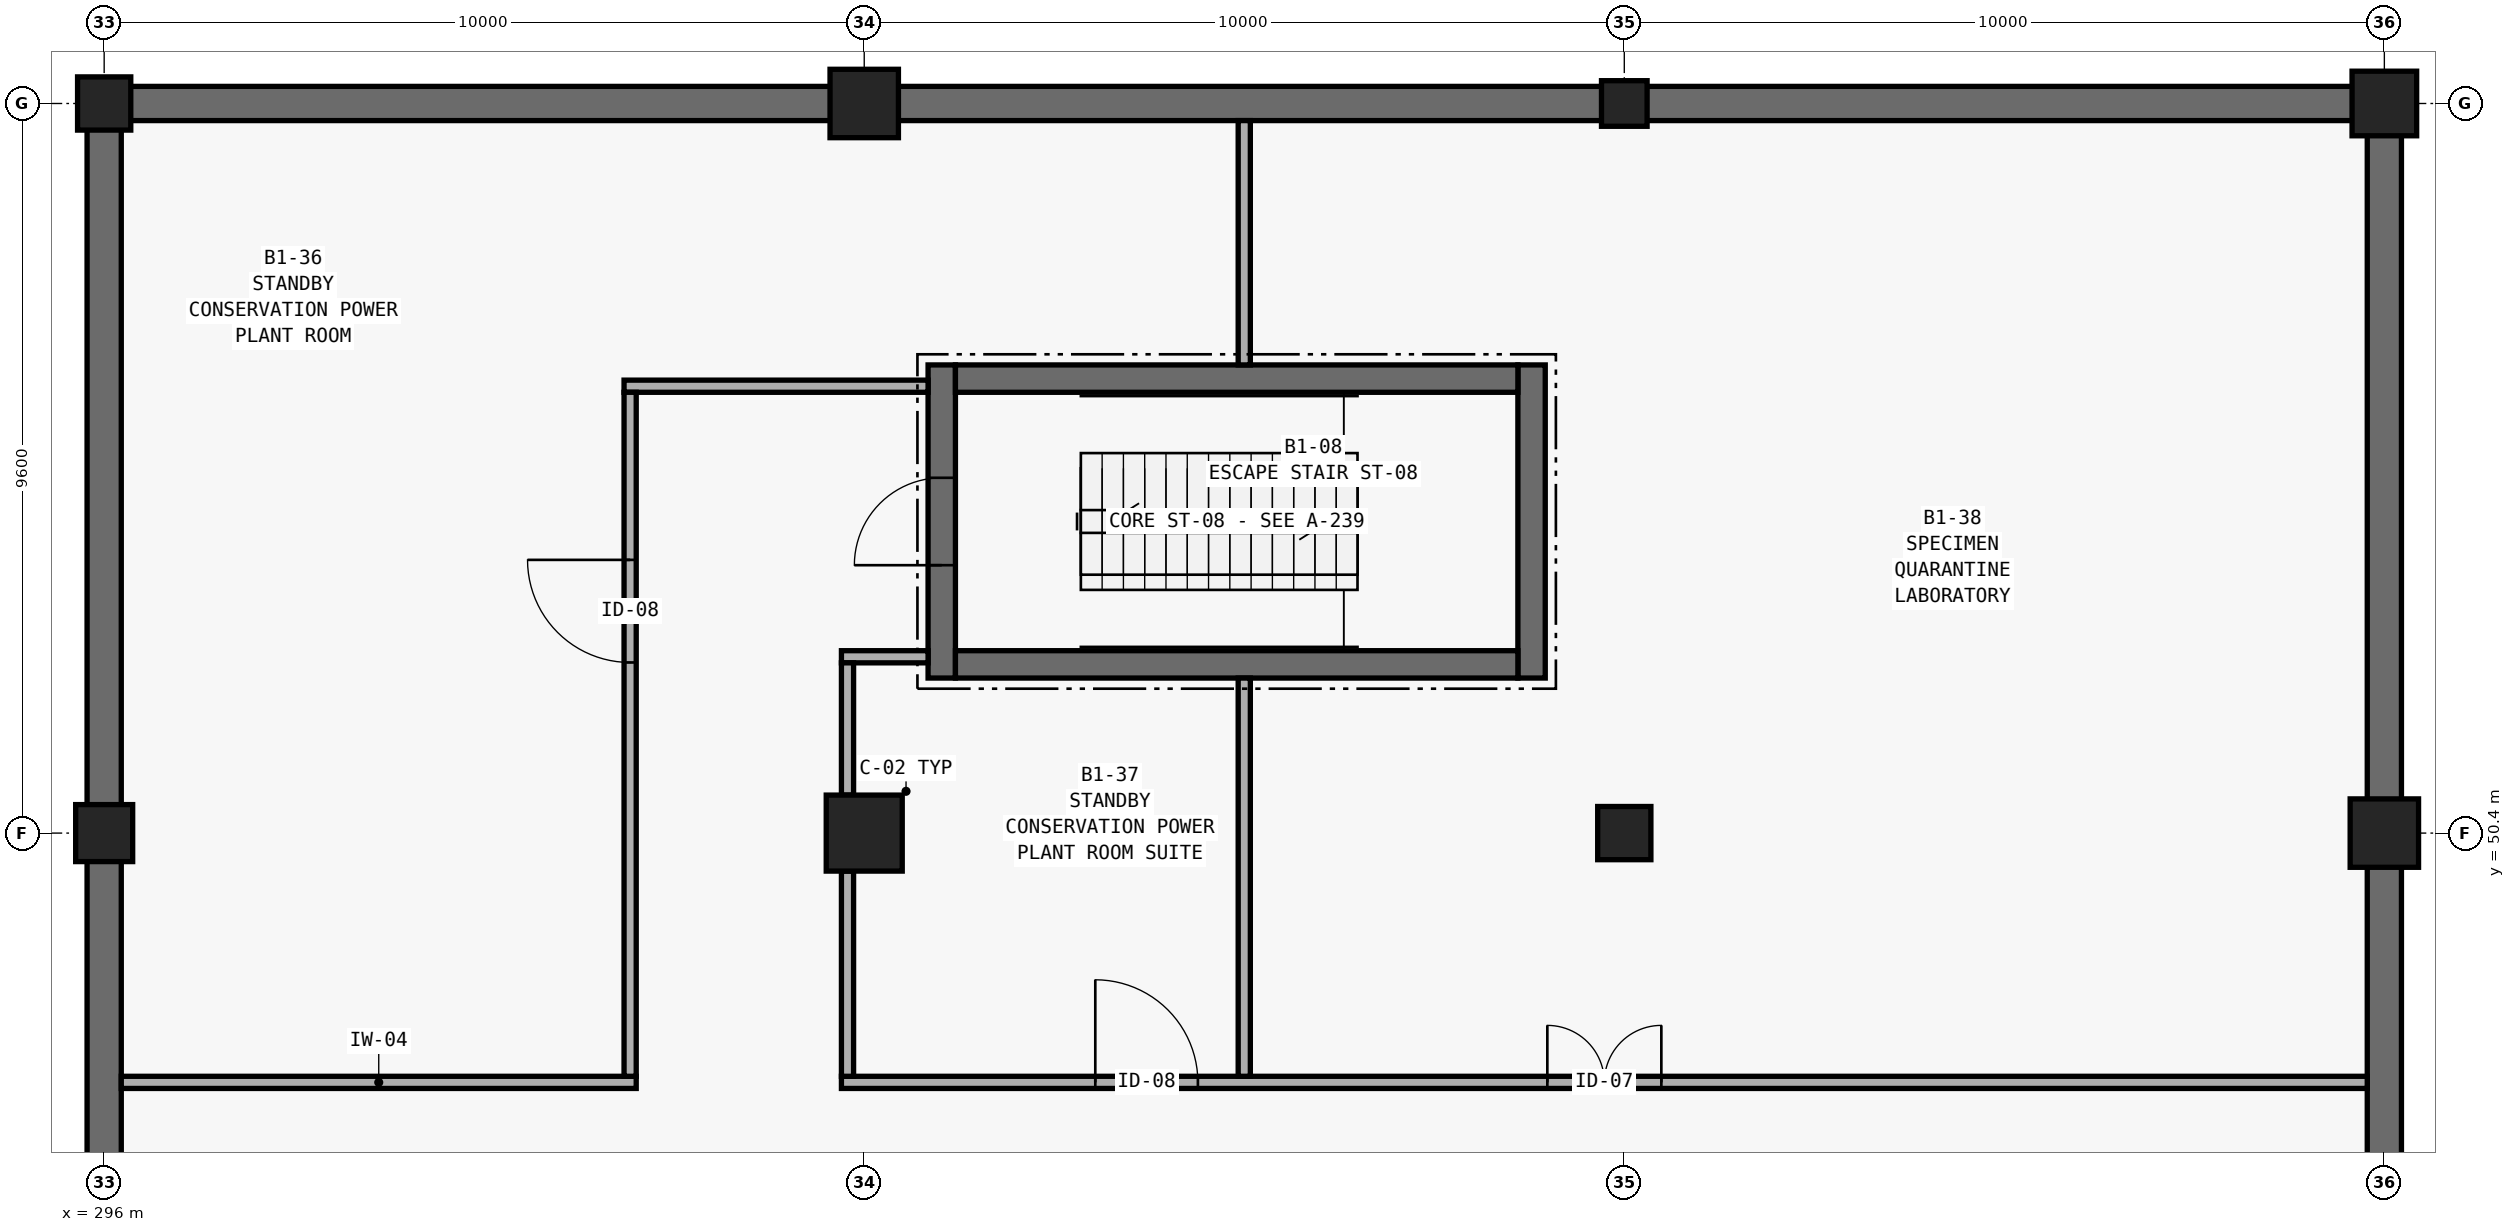
"""IFC4 building model, lengths in metres.
Left out: names, types, materials, properties, quantities, classifications, styles, units other than length and angle.
Written with IfcOpenShell. Run it as: python <this file> out.ifc"""

import sys

from ifc_helpers import new_model, si_unit, direction, frame, frame_2d, origin, origin_2d, place, context, subcontext, project, spatial, rectangle, extrude, element, fill, save


model = new_model("IFC4")
c1 = context("Model", 3, precision=1e-05, world=origin(), true_north=direction((0.0, 1.0)))
c2 = subcontext(c1, "Body", "Model", "MODEL_VIEW")
j1 = project(units=[si_unit("LENGTHUNIT", "METRE"), si_unit("PLANEANGLEUNIT", "RADIAN")], contexts=[c1])
p1 = place(None, origin())
s1 = spatial("IfcSite", under=j1, at=p1, CompositionType="ELEMENT")
p2 = place(p1, origin())
s2 = spatial("IfcBuilding", under=s1, at=p2, CompositionType="ELEMENT")
p3 = place(p2, frame((0.0, 0.0, -4.8)))
s3 = spatial("IfcBuildingStorey", under=s2, at=p3, CompositionType="ELEMENT", Elevation=-4.8)
p4 = place(p3, frame((296.0, 50.4, 0.0), z_axis=(0.0, 0.0, 1.0), x_axis=(1.0, 0.0, 0.0)))
e1 = element("IfcColumn", 1, at=p4, inside=s3, PredefinedType="COLUMN", context=c2, shape_type="SweptSolid", body=[
    extrude(rectangle(XDim=0.75, YDim=0.75, at=origin_2d()), origin(), (0.0, 0.0, 1.0), 4.8),
])
p5 = place(p3, frame((296.0, 60.0, 0.0), z_axis=(0.0, 0.0, 1.0), x_axis=(1.0, 0.0, 0.0)))
e2 = element("IfcColumn", 2, at=p5, inside=s3, PredefinedType="COLUMN", context=c2, shape_type="SweptSolid", body=[
    extrude(rectangle(XDim=0.7, YDim=0.7, at=origin_2d()), origin(), (0.0, 0.0, 1.0), 4.8),
])
p6 = place(p3, frame((306.0, 50.4, 0.0), z_axis=(0.0, 0.0, 1.0), x_axis=(1.0, 0.0, 0.0)))
e3 = element("IfcColumn", 3, at=p6, inside=s3, PredefinedType="COLUMN", context=c2, shape_type="SweptSolid", body=[
    extrude(rectangle(XDim=1.0, YDim=1.0, at=origin_2d()), origin(), (0.0, 0.0, 1.0), 4.8),
])
p7 = place(p3, frame((306.0, 60.0, 0.0), z_axis=(0.0, 0.0, 1.0), x_axis=(1.0, 0.0, 0.0)))
e4 = element("IfcColumn", 4, at=p7, inside=s3, PredefinedType="COLUMN", context=c2, shape_type="SweptSolid", body=[
    extrude(rectangle(XDim=0.9, YDim=0.9, at=origin_2d()), origin(), (0.0, 0.0, 1.0), 4.8),
])
p8 = place(p3, frame((316.0, 50.4, 0.0), z_axis=(0.0, 0.0, 1.0), x_axis=(1.0, 0.0, 0.0)))
e5 = element("IfcColumn", 5, at=p8, inside=s3, PredefinedType="COLUMN", context=c2, shape_type="SweptSolid", body=[
    extrude(rectangle(XDim=0.7, YDim=0.7, at=origin_2d()), origin(), (0.0, 0.0, 1.0), 4.8),
])
p9 = place(p3, frame((316.0, 60.0, 0.0), z_axis=(0.0, 0.0, 1.0), x_axis=(1.0, 0.0, 0.0)))
e6 = element("IfcColumn", 6, at=p9, inside=s3, PredefinedType="COLUMN", context=c2, shape_type="SweptSolid", body=[
    extrude(rectangle(XDim=0.6, YDim=0.6, at=origin_2d()), origin(), (0.0, 0.0, 1.0), 4.8),
])
p10 = place(p3, frame((326.0, 50.4, 0.0), z_axis=(0.0, 0.0, 1.0), x_axis=(1.0, 0.0, 0.0)))
e7 = element("IfcColumn", 7, at=p10, inside=s3, PredefinedType="COLUMN", context=c2, shape_type="SweptSolid", body=[
    extrude(rectangle(XDim=0.9, YDim=0.9, at=origin_2d()), origin(), (0.0, 0.0, 1.0), 4.8),
])
p11 = place(p3, frame((326.0, 60.0, 0.0), z_axis=(0.0, 0.0, 1.0), x_axis=(1.0, 0.0, 0.0)))
e8 = element("IfcColumn", 8, at=p11, inside=s3, PredefinedType="COLUMN", context=c2, shape_type="SweptSolid", body=[
    extrude(rectangle(XDim=0.85, YDim=0.85, at=origin_2d()), origin(), (0.0, 0.0, 1.0), 4.8),
])
p12 = place(p3, frame((326.0, 38.4, 0.0), z_axis=(0.0, 0.0, 1.0), x_axis=(0.0, 1.0, 0.0)))
e9 = element("IfcWall", 9, at=p12, inside=s3, PredefinedType="SHEAR", context=c2, shape_type="SweptSolid", body=[
    extrude(rectangle(XDim=12.0, YDim=0.45, at=frame_2d((6.0, 0.0))), origin(), (0.0, 0.0, 1.0), 4.8),
])
p13 = place(p3, frame((326.0, 50.4, 0.0), z_axis=(0.0, 0.0, 1.0), x_axis=(0.0, 1.0, 0.0)))
e10 = element("IfcWall", 10, at=p13, inside=s3, PredefinedType="SHEAR", context=c2, shape_type="SweptSolid", body=[
    extrude(rectangle(XDim=9.6, YDim=0.45, at=frame_2d((4.8, 0.0))), origin(), (0.0, 0.0, 1.0), 4.8),
])
for number, where, z_axis, x_axis in (
    (11, (326.0, 60.0, 0.0), (0.0, 0.0, 1.0), (-1.0, 0.0, 0.0)),
    (12, (316.0, 60.0, 0.0), (0.0, 0.0, 1.0), (-1.0, 0.0, 0.0)),
    (13, (306.0, 60.0, 0.0), (0.0, 0.0, 1.0), (-1.0, 0.0, 0.0)),
):
    element("IfcWall", number, at=place(p3, frame(where, z_axis=z_axis, x_axis=x_axis)), inside=s3, PredefinedType="SHEAR", context=c2, shape_type="SweptSolid", body=[
        extrude(rectangle(XDim=10.0, YDim=0.45, at=frame_2d((5.0, 0.0))), origin(), (0.0, 0.0, 1.0), 4.8),
    ])
p14 = place(p3, frame((296.0, 60.0, 0.0), z_axis=(0.0, 0.0, 1.0), x_axis=(0.0, -1.0, 0.0)))
e14 = element("IfcWall", 14, at=p14, inside=s3, PredefinedType="SHEAR", context=c2, shape_type="SweptSolid", body=[
    extrude(rectangle(XDim=9.6, YDim=0.45, at=frame_2d((4.8, 0.0))), origin(), (0.0, 0.0, 1.0), 4.8),
])
p15 = place(p3, frame((296.0, 50.4, 0.0), z_axis=(0.0, 0.0, 1.0), x_axis=(0.0, -1.0, 0.0)))
e15 = element("IfcWall", 15, at=p15, inside=s3, PredefinedType="SHEAR", context=c2, shape_type="SweptSolid", body=[
    extrude(rectangle(XDim=12.0, YDim=0.45, at=frame_2d((6.0, 0.0))), origin(), (0.0, 0.0, 1.0), 4.8),
])
p16 = place(p3, frame((307.02, 52.44, 0.0), z_axis=(0.0, 0.0, 1.0), x_axis=(0.0, 1.0, 0.0)))
e16 = element("IfcWall", 16, at=p16, inside=s3, PredefinedType="SHEAR", context=c2, shape_type="SweptSolid", body=[
    extrude(rectangle(XDim=4.12, YDim=0.36, at=frame_2d((2.06, 0.0))), origin(), (0.0, 0.0, 1.0), 4.38),
])
p17 = place(p16, frame((1.485, 0.0, 0.0)))
e17 = element("IfcOpeningElement", 17, at=p17, cuts=e16, PredefinedType="OPENING", context=c2, shape_type="SweptSolid", body=[
    extrude(rectangle(XDim=1.15, YDim=2.15, at=frame_2d((0.575, 1.075))), frame((0.0, 0.195, 0.0), z_axis=(0.0, -1.0, 0.0), x_axis=(1.0, 0.0, 0.0)), (0.0, 0.0, 1.0), 0.39),
])
p18 = place(p3, frame((314.78, 52.44, 0.0), z_axis=(0.0, 0.0, 1.0), x_axis=(0.0, 1.0, 0.0)))
e18 = element("IfcWall", 18, at=p18, inside=s3, PredefinedType="SHEAR", context=c2, shape_type="SweptSolid", body=[
    extrude(rectangle(XDim=4.12, YDim=0.36, at=frame_2d((2.06, 0.0))), origin(), (0.0, 0.0, 1.0), 4.38),
])
for number, where, z_axis, x_axis in (
    (19, (307.2, 56.38, 0.0), (0.0, 0.0, 1.0), (1.0, 0.0, 0.0)),
    (20, (307.2, 52.62, 0.0), (0.0, 0.0, 1.0), (1.0, 0.0, 0.0)),
):
    element("IfcWall", number, at=place(p3, frame(where, z_axis=z_axis, x_axis=x_axis)), inside=s3, PredefinedType="SHEAR", context=c2, shape_type="SweptSolid", body=[
        extrude(rectangle(XDim=7.4, YDim=0.36, at=frame_2d((3.7, 0.0))), origin(), (0.0, 0.0, 1.0), 4.38),
    ])
p19 = place(p3, frame((296.225, 47.12, 0.0), z_axis=(0.0, 0.0, 1.0), x_axis=(1.0, 0.0, 0.0)))
e21 = element("IfcWall", 21, at=p19, inside=s3, PredefinedType="PARTITIONING", context=c2, shape_type="SweptSolid", body=[
    extrude(rectangle(XDim=6.775, YDim=0.16, at=frame_2d((3.387, 0.0))), origin(), (0.0, 0.0, 1.0), 3.26),
])
p20 = place(p3, frame((305.7, 47.12, 0.0), z_axis=(0.0, 0.0, 1.0), x_axis=(1.0, 0.0, 0.0)))
e22 = element("IfcWall", 22, at=p20, inside=s3, PredefinedType="PARTITIONING", context=c2, shape_type="SweptSolid", body=[
    extrude(rectangle(XDim=20.075, YDim=0.16, at=frame_2d((10.038, 0.0))), origin(), (0.0, 0.0, 1.0), 3.26),
])
p21 = place(p20, frame((3.34, 0.0, 0.0)))
e23 = element("IfcOpeningElement", 23, at=p21, cuts=e22, PredefinedType="OPENING", context=c2, shape_type="SweptSolid", body=[
    extrude(rectangle(XDim=1.35, YDim=2.2, at=frame_2d((0.675, 1.1))), frame((0.0, 0.095, 0.0), z_axis=(0.0, -1.0, 0.0), x_axis=(1.0, 0.0, 0.0)), (0.0, 0.0, 1.0), 0.19),
])
p22 = place(p20, frame((9.288, 0.0, 0.0)))
e24 = element("IfcOpeningElement", 24, at=p22, cuts=e22, PredefinedType="OPENING", context=c2, shape_type="SweptSolid", body=[
    extrude(rectangle(XDim=1.5, YDim=2.2, at=frame_2d((0.75, 1.1))), frame((0.0, 0.095, 0.0), z_axis=(0.0, -1.0, 0.0), x_axis=(1.0, 0.0, 0.0)), (0.0, 0.0, 1.0), 0.19),
])
p23 = place(p3, frame((305.7, 52.72, 0.0), z_axis=(0.0, 0.0, 1.0), x_axis=(1.0, 0.0, 0.0)))
e25 = element("IfcWall", 25, at=p23, inside=s3, PredefinedType="PARTITIONING", context=c2, shape_type="SweptSolid", body=[
    extrude(rectangle(XDim=1.14, YDim=0.16, at=frame_2d((0.57, 0.0))), origin(), (0.0, 0.0, 1.0), 3.26),
])
p24 = place(p3, frame((302.84, 56.28, 0.0), z_axis=(0.0, 0.0, 1.0), x_axis=(1.0, 0.0, 0.0)))
e26 = element("IfcWall", 26, at=p24, inside=s3, PredefinedType="PARTITIONING", context=c2, shape_type="SweptSolid", body=[
    extrude(rectangle(XDim=4.0, YDim=0.16, at=frame_2d((2.0, 0.0))), origin(), (0.0, 0.0, 1.0), 3.26),
])
p25 = place(p3, frame((302.92, 47.2, 0.0), z_axis=(0.0, 0.0, 1.0), x_axis=(0.0, 1.0, 0.0)))
e27 = element("IfcWall", 27, at=p25, inside=s3, PredefinedType="PARTITIONING", context=c2, shape_type="SweptSolid", body=[
    extrude(rectangle(XDim=9.0, YDim=0.16, at=frame_2d((4.5, 0.0))), origin(), (0.0, 0.0, 1.0), 3.26),
])
p26 = place(p25, frame((5.445, 0.0, 0.0)))
e28 = element("IfcOpeningElement", 28, at=p26, cuts=e27, PredefinedType="OPENING", context=c2, shape_type="SweptSolid", body=[
    extrude(rectangle(XDim=1.35, YDim=2.2, at=frame_2d((0.675, 1.1))), frame((0.0, 0.095, 0.0), z_axis=(0.0, -1.0, 0.0), x_axis=(1.0, 0.0, 0.0)), (0.0, 0.0, 1.0), 0.19),
])
p27 = place(p3, frame((305.78, 47.2, 0.0), z_axis=(0.0, 0.0, 1.0), x_axis=(0.0, 1.0, 0.0)))
e29 = element("IfcWall", 29, at=p27, inside=s3, PredefinedType="PARTITIONING", context=c2, shape_type="SweptSolid", body=[
    extrude(rectangle(XDim=2.7, YDim=0.16, at=frame_2d((1.35, 0.0))), origin(), (0.0, 0.0, 1.0), 3.26),
])
p28 = place(p3, frame((305.78, 50.9, 0.0), z_axis=(0.0, 0.0, 1.0), x_axis=(0.0, 1.0, 0.0)))
e30 = element("IfcWall", 30, at=p28, inside=s3, PredefinedType="PARTITIONING", context=c2, shape_type="SweptSolid", body=[
    extrude(rectangle(XDim=1.74, YDim=0.16, at=frame_2d((0.87, 0.0))), origin(), (0.0, 0.0, 1.0), 3.26),
])
p29 = place(p3, frame((311.0, 47.2, 0.0), z_axis=(0.0, 0.0, 1.0), x_axis=(0.0, 1.0, 0.0)))
e31 = element("IfcWall", 31, at=p29, inside=s3, PredefinedType="PARTITIONING", context=c2, shape_type="SweptSolid", body=[
    extrude(rectangle(XDim=5.24, YDim=0.16, at=frame_2d((2.62, 0.0))), origin(), (0.0, 0.0, 1.0), 3.26),
])
p30 = place(p3, frame((311.0, 56.56, 0.0), z_axis=(0.0, 0.0, 1.0), x_axis=(0.0, 1.0, 0.0)))
e32 = element("IfcWall", 32, at=p30, inside=s3, PredefinedType="PARTITIONING", context=c2, shape_type="SweptSolid", body=[
    extrude(rectangle(XDim=3.215, YDim=0.16, at=frame_2d((1.607, 0.0))), origin(), (0.0, 0.0, 1.0), 3.26),
])
p31 = place(p17, origin())
e33 = element("IfcDoor", 33, at=p31, inside=s3, OperationType="SINGLE_SWING_LEFT", PredefinedType="DOOR", context=c2, shape_type="SweptSolid", body=[
    extrude(rectangle(XDim=1.15, YDim=2.15, at=frame_2d((0.575, 1.075))), frame((0.0, 0.025, 0.0), z_axis=(0.0, -1.0, 0.0), x_axis=(1.0, 0.0, 0.0)), (0.0, 0.0, 1.0), 0.05),
])
fill(e17, e33)
p32 = place(p26, origin())
e34 = element("IfcDoor", 34, at=p32, inside=s3, OperationType="SINGLE_SWING_RIGHT", PredefinedType="DOOR", context=c2, shape_type="SweptSolid", body=[
    extrude(rectangle(XDim=1.35, YDim=2.2, at=frame_2d((0.675, 1.1))), frame((0.0, 0.025, 0.0), z_axis=(0.0, -1.0, 0.0), x_axis=(1.0, 0.0, 0.0)), (0.0, 0.0, 1.0), 0.05),
])
fill(e28, e34)
p33 = place(p21, origin())
e35 = element("IfcDoor", 35, at=p33, inside=s3, OperationType="SINGLE_SWING_LEFT", PredefinedType="DOOR", context=c2, shape_type="SweptSolid", body=[
    extrude(rectangle(XDim=1.35, YDim=2.2, at=frame_2d((0.675, 1.1))), frame((0.0, 0.025, 0.0), z_axis=(0.0, -1.0, 0.0), x_axis=(1.0, 0.0, 0.0)), (0.0, 0.0, 1.0), 0.05),
])
fill(e23, e35)
p34 = place(p22, origin())
e36 = element("IfcDoor", 36, at=p34, inside=s3, OperationType="DOUBLE_DOOR_SINGLE_SWING", PredefinedType="DOOR", context=c2, shape_type="SweptSolid", body=[
    extrude(rectangle(XDim=1.5, YDim=2.2, at=frame_2d((0.75, 1.1))), frame((0.0, 0.025, 0.0), z_axis=(0.0, -1.0, 0.0), x_axis=(1.0, 0.0, 0.0)), (0.0, 0.0, 1.0), 0.05),
])
fill(e24, e36)
save(model, sys.argv[1])
